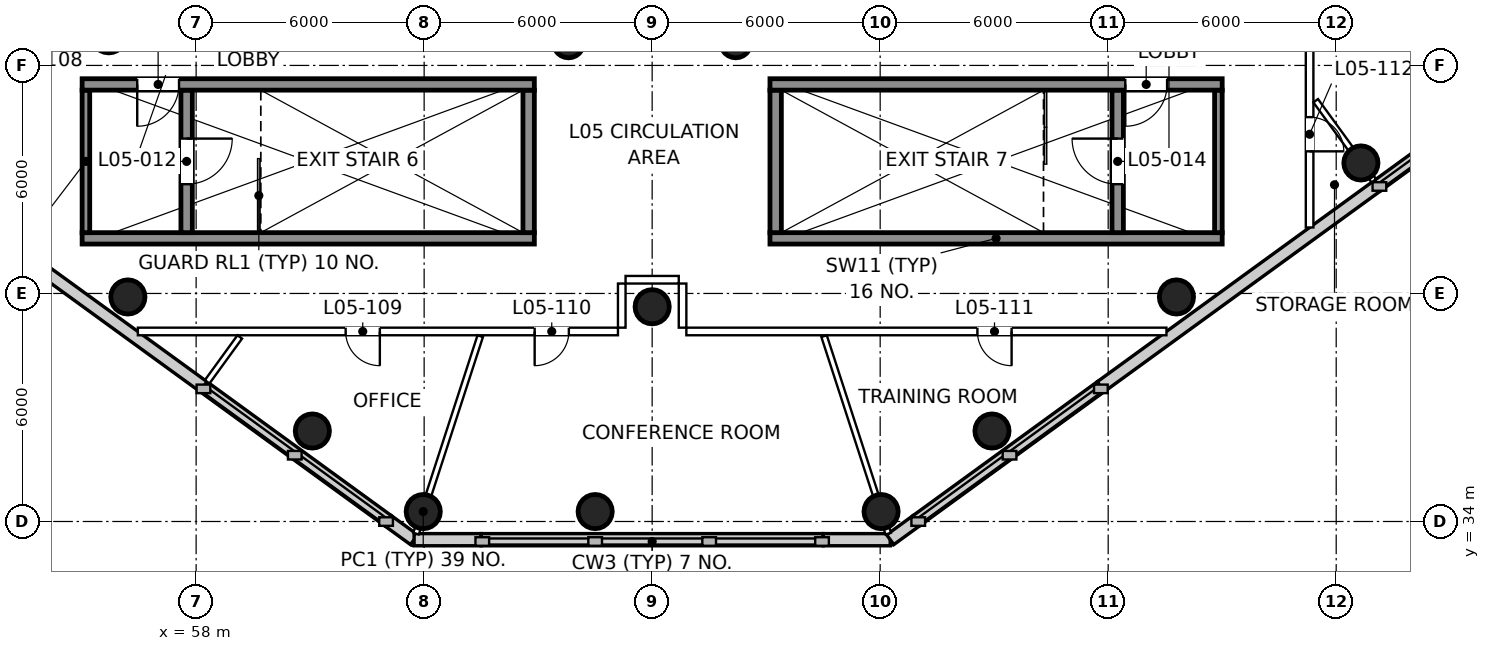
"""IFC4 building model, lengths in metres.
Left out: names, types, materials, properties, quantities, classifications, styles, units other than length and angle.
Written with IfcOpenShell. Run it as: python <this file> out.ifc"""

import sys

from ifc_helpers import new_model, si_unit, direction, frame, frame_2d, origin, origin_2d, place, context, subcontext, project, spatial, rectangle, circle, extrude, element, fill, save


model = new_model("IFC4")
c1 = context("Model", 3, precision=1e-05, world=origin(), true_north=direction((0.0, 1.0)))
c2 = subcontext(c1, "Body", "Model", "MODEL_VIEW")
j1 = project(units=[si_unit("LENGTHUNIT", "METRE"), si_unit("PLANEANGLEUNIT", "RADIAN")], contexts=[c1])
p1 = place(None, origin())
s1 = spatial("IfcSite", under=j1, at=p1, CompositionType="ELEMENT")
p2 = place(p1, origin())
s2 = spatial("IfcBuilding", under=s1, at=p2, CompositionType="ELEMENT")
p3 = place(p2, frame((0.0, 0.0, 34.0)))
s3 = spatial("IfcBuildingStorey", under=s2, at=p3, CompositionType="ELEMENT", Elevation=34.0)
for number, where, z_axis, x_axis in (
    (1, (55.7, 46.78, 0.0), (0.0, 0.0, 1.0), (1.0, 0.0, 0.0)),
    (2, (70.0, 39.65, 0.0), (0.0, 0.0, 1.0), (1.0, 0.0, 0.0)),
):
    element("IfcColumn", number, at=place(p3, frame(where, z_axis=z_axis, x_axis=x_axis)), inside=s3, PredefinedType="COLUMN", context=c2, shape_type="SweptSolid", body=[
        extrude(circle(Radius=0.45, at=origin_2d()), origin(), (0.0, 0.0, 1.0), 5.0),
    ])
for number, where, z_axis, x_axis in (
    (3, (67.8, 46.6, 0.0), (0.0, 0.0, 1.0), (1.0, 0.0, 0.0)),
    (4, (72.2, 46.6, 0.0), (0.0, 0.0, 1.0), (1.0, 0.0, 0.0)),
):
    element("IfcColumn", number, at=place(p3, frame(where, z_axis=z_axis, x_axis=x_axis)), inside=s3, PredefinedType="COLUMN", context=c2, shape_type="SweptSolid", body=[
        extrude(circle(Radius=0.4, at=origin_2d()), origin(), (0.0, 0.0, 1.0), 5.0),
    ])
for number, where, z_axis, x_axis in (
    (5, (56.204, 39.908, 0.0), (0.0, 0.0, 1.0), (1.0, 0.0, 0.0)),
    (6, (61.058, 36.381, 0.0), (0.0, 0.0, 1.0), (1.0, 0.0, 0.0)),
    (7, (63.976, 34.261, 0.0), (0.0, 0.0, 1.0), (1.0, 0.0, 0.0)),
    (8, (68.5, 34.261, 0.0), (0.0, 0.0, 1.0), (1.0, 0.0, 0.0)),
    (9, (76.024, 34.261, 0.0), (0.0, 0.0, 1.0), (1.0, 0.0, 0.0)),
    (10, (78.942, 36.381, 0.0), (0.0, 0.0, 1.0), (1.0, 0.0, 0.0)),
    (11, (83.796, 39.908, 0.0), (0.0, 0.0, 1.0), (1.0, 0.0, 0.0)),
    (12, (88.65, 43.434, 0.0), (0.0, 0.0, 1.0), (1.0, 0.0, 0.0)),
):
    element("IfcColumn", number, at=place(p3, frame(where, z_axis=z_axis, x_axis=x_axis)), inside=s3, PredefinedType="COLUMN", context=c2, shape_type="SweptSolid", body=[
        extrude(circle(Radius=0.45, at=origin_2d()), origin(), (0.0, 0.0, 1.0), 5.0),
    ])
p4 = place(p3, frame((50.915, 42.836, 0.0), z_axis=(0.0, 0.0, 1.0), x_axis=(0.809022210299, -0.587778073121, 0.0)))
e13 = element("IfcWall", 13, at=p4, inside=s3, PredefinedType="SOLIDWALL", context=c2, shape_type="SweptSolid", body=[
    extrude(rectangle(XDim=9.0, YDim=0.32, at=frame_2d((4.5, 0.0))), origin(), (0.0, 0.0, 1.0), 4.6),
])
p5 = place(p3, frame((58.196, 37.546, 0.0), z_axis=(0.0, 0.0, 1.0), x_axis=(0.809019288122, -0.587782095208, 0.0)))
e14 = element("IfcWall", 14, at=p5, inside=s3, PredefinedType="SOLIDWALL", context=c2, shape_type="SweptSolid", body=[
    extrude(rectangle(XDim=6.0, YDim=0.32, at=frame_2d((3.0, 0.0))), origin(), (0.0, 0.0, 1.0), 0.9),
])
p6 = place(p3, frame((63.05, 34.019, 0.0), z_axis=(0.0, 0.0, 1.0), x_axis=(0.809034999426, -0.587760469668, 0.0)))
e15 = element("IfcWall", 15, at=p6, inside=s3, PredefinedType="SOLIDWALL", context=c2, shape_type="SweptSolid", body=[
    extrude(rectangle(XDim=0.847, YDim=0.32, at=frame_2d((0.424, 0.0))), origin(), (0.0, 0.0, 1.0), 4.6),
])
p7 = place(p3, frame((63.736, 33.521, 0.0), z_axis=(0.0, 0.0, 1.0), x_axis=(1.0, 0.0, 0.0)))
e16 = element("IfcWall", 16, at=p7, inside=s3, PredefinedType="SOLIDWALL", context=c2, shape_type="SweptSolid", body=[
    extrude(rectangle(XDim=1.764, YDim=0.32, at=frame_2d((0.882, 0.0))), origin(), (0.0, 0.0, 1.0), 4.6),
])
p8 = place(p3, frame((65.5, 33.521, 0.0), z_axis=(0.0, 0.0, 1.0), x_axis=(1.0, 0.0, 0.0)))
e17 = element("IfcWall", 17, at=p8, inside=s3, PredefinedType="SOLIDWALL", context=c2, shape_type="SweptSolid", body=[
    extrude(rectangle(XDim=9.0, YDim=0.32, at=frame_2d((4.5, 0.0))), origin(), (0.0, 0.0, 1.0), 0.9),
])
p9 = place(p3, frame((74.5, 33.521, 0.0), z_axis=(0.0, 0.0, 1.0), x_axis=(1.0, 0.0, 0.0)))
e18 = element("IfcWall", 18, at=p9, inside=s3, PredefinedType="SOLIDWALL", context=c2, shape_type="SweptSolid", body=[
    extrude(rectangle(XDim=1.764, YDim=0.32, at=frame_2d((0.882, 0.0))), origin(), (0.0, 0.0, 1.0), 4.6),
])
p10 = place(p3, frame((76.264, 33.521, 0.0), z_axis=(0.0, 0.0, 1.0), x_axis=(0.809034999426, 0.587760469668, 0.0)))
e19 = element("IfcWall", 19, at=p10, inside=s3, PredefinedType="SOLIDWALL", context=c2, shape_type="SweptSolid", body=[
    extrude(rectangle(XDim=0.847, YDim=0.32, at=frame_2d((0.424, 0.0))), origin(), (0.0, 0.0, 1.0), 4.6),
])
p11 = place(p3, frame((76.95, 34.019, 0.0), z_axis=(0.0, 0.0, 1.0), x_axis=(0.809019288122, 0.587782095208, 0.0)))
e20 = element("IfcWall", 20, at=p11, inside=s3, PredefinedType="SOLIDWALL", context=c2, shape_type="SweptSolid", body=[
    extrude(rectangle(XDim=6.0, YDim=0.32, at=frame_2d((3.0, 0.0))), origin(), (0.0, 0.0, 1.0), 0.9),
])
p12 = place(p3, frame((81.804, 37.546, 0.0), z_axis=(0.0, 0.0, 1.0), x_axis=(0.809022210299, 0.587778073121, 0.0)))
e21 = element("IfcWall", 21, at=p12, inside=s3, PredefinedType="SOLIDWALL", context=c2, shape_type="SweptSolid", body=[
    extrude(rectangle(XDim=9.0, YDim=0.32, at=frame_2d((4.5, 0.0))), origin(), (0.0, 0.0, 1.0), 4.6),
])
p13 = place(p3, frame((89.085, 42.836, 0.0), z_axis=(0.0, 0.0, 1.0), x_axis=(0.808999938455, 0.587808727036, 0.0)))
e22 = element("IfcWall", 22, at=p13, inside=s3, PredefinedType="SOLIDWALL", context=c2, shape_type="SweptSolid", body=[
    extrude(rectangle(XDim=9.0, YDim=0.32, at=frame_2d((4.5, 0.0))), origin(), (0.0, 0.0, 1.0), 0.9),
])
for number, where, z_axis, x_axis in (
    (23, (55.0, 41.45, 0.0), (0.0, 0.0, 1.0), (1.0, 0.0, 0.0)),
    (24, (73.1, 41.45, 0.0), (0.0, 0.0, 1.0), (1.0, 0.0, 0.0)),
):
    element("IfcWall", number, at=place(p3, frame(where, z_axis=z_axis, x_axis=x_axis)), inside=s3, PredefinedType="SHEAR", context=c2, shape_type="SweptSolid", body=[
        extrude(rectangle(XDim=11.9, YDim=0.3, at=frame_2d((5.95, 0.0))), origin(), (0.0, 0.0, 1.0), 5.0),
    ])
p14 = place(p3, frame((55.1, 41.6, 0.0), z_axis=(0.0, 0.0, 1.0), x_axis=(0.0, 1.0, 0.0)))
e25 = element("IfcWall", 25, at=p14, inside=s3, PredefinedType="SHEAR", context=c2, shape_type="SweptSolid", body=[
    extrude(rectangle(XDim=3.75, YDim=0.2, at=frame_2d((1.875, 0.0))), origin(), (0.0, 0.0, 1.0), 5.0),
])
p15 = place(p3, frame((57.75, 41.6, 0.0), z_axis=(0.0, 0.0, 1.0), x_axis=(0.0, 1.0, 0.0)))
e26 = element("IfcWall", 26, at=p15, inside=s3, PredefinedType="SHEAR", context=c2, shape_type="SweptSolid", body=[
    extrude(rectangle(XDim=3.75, YDim=0.3, at=frame_2d((1.875, 0.0))), origin(), (0.0, 0.0, 1.0), 5.0),
])
p16 = place(p15, frame((1.275, 0.0, 0.0)))
e27 = element("IfcOpeningElement", 27, at=p16, cuts=e26, PredefinedType="OPENING", context=c2, shape_type="SweptSolid", body=[
    extrude(rectangle(XDim=1.2, YDim=2.1, at=frame_2d((0.6, 1.05))), frame((0.0, 0.16, 0.0), z_axis=(0.0, -1.0, 0.0), x_axis=(1.0, 0.0, 0.0)), (0.0, 0.0, 1.0), 0.32),
])
for number, where, z_axis, x_axis in (
    (28, (66.75, 41.6, 0.0), (0.0, 0.0, 1.0), (0.0, 1.0, 0.0)),
    (29, (73.25, 41.6, 0.0), (0.0, 0.0, 1.0), (0.0, 1.0, 0.0)),
):
    element("IfcWall", number, at=place(p3, frame(where, z_axis=z_axis, x_axis=x_axis)), inside=s3, PredefinedType="SHEAR", context=c2, shape_type="SweptSolid", body=[
        extrude(rectangle(XDim=3.75, YDim=0.3, at=frame_2d((1.875, 0.0))), origin(), (0.0, 0.0, 1.0), 5.0),
    ])
p17 = place(p3, frame((82.25, 41.6, 0.0), z_axis=(0.0, 0.0, 1.0), x_axis=(0.0, 1.0, 0.0)))
e30 = element("IfcWall", 30, at=p17, inside=s3, PredefinedType="SHEAR", context=c2, shape_type="SweptSolid", body=[
    extrude(rectangle(XDim=3.75, YDim=0.3, at=frame_2d((1.875, 0.0))), origin(), (0.0, 0.0, 1.0), 5.0),
])
p18 = place(p17, frame((1.275, 0.0, 0.0)))
e31 = element("IfcOpeningElement", 31, at=p18, cuts=e30, PredefinedType="OPENING", context=c2, shape_type="SweptSolid", body=[
    extrude(rectangle(XDim=1.2, YDim=2.1, at=frame_2d((0.6, 1.05))), frame((0.0, 0.16, 0.0), z_axis=(0.0, -1.0, 0.0), x_axis=(1.0, 0.0, 0.0)), (0.0, 0.0, 1.0), 0.32),
])
p19 = place(p3, frame((84.9, 41.6, 0.0), z_axis=(0.0, 0.0, 1.0), x_axis=(0.0, 1.0, 0.0)))
e32 = element("IfcWall", 32, at=p19, inside=s3, PredefinedType="SHEAR", context=c2, shape_type="SweptSolid", body=[
    extrude(rectangle(XDim=3.75, YDim=0.2, at=frame_2d((1.875, 0.0))), origin(), (0.0, 0.0, 1.0), 5.0),
])
p20 = place(p3, frame((55.0, 45.5, 0.0), z_axis=(0.0, 0.0, 1.0), x_axis=(1.0, 0.0, 0.0)))
e33 = element("IfcWall", 33, at=p20, inside=s3, PredefinedType="SHEAR", context=c2, shape_type="SweptSolid", body=[
    extrude(rectangle(XDim=11.9, YDim=0.3, at=frame_2d((5.95, 0.0))), origin(), (0.0, 0.0, 1.0), 5.0),
])
p21 = place(p20, frame((1.45, 0.0, 0.0)))
e34 = element("IfcOpeningElement", 34, at=p21, cuts=e33, PredefinedType="OPENING", context=c2, shape_type="SweptSolid", body=[
    extrude(rectangle(XDim=1.1, YDim=2.1, at=frame_2d((0.55, 1.05))), frame((0.0, 0.16, 0.0), z_axis=(0.0, -1.0, 0.0), x_axis=(1.0, 0.0, 0.0)), (0.0, 0.0, 1.0), 0.32),
])
p22 = place(p3, frame((73.1, 45.5, 0.0), z_axis=(0.0, 0.0, 1.0), x_axis=(1.0, 0.0, 0.0)))
e35 = element("IfcWall", 35, at=p22, inside=s3, PredefinedType="SHEAR", context=c2, shape_type="SweptSolid", body=[
    extrude(rectangle(XDim=11.9, YDim=0.3, at=frame_2d((5.95, 0.0))), origin(), (0.0, 0.0, 1.0), 5.0),
])
p23 = place(p22, frame((9.35, 0.0, 0.0)))
e36 = element("IfcOpeningElement", 36, at=p23, cuts=e35, PredefinedType="OPENING", context=c2, shape_type="SweptSolid", body=[
    extrude(rectangle(XDim=1.1, YDim=2.1, at=frame_2d((0.55, 1.05))), frame((0.0, 0.16, 0.0), z_axis=(0.0, -1.0, 0.0), x_axis=(1.0, 0.0, 0.0)), (0.0, 0.0, 1.0), 0.32),
])
p24 = place(p3, frame((87.3, 47.85, 0.0), z_axis=(0.0, 0.0, 1.0), x_axis=(0.0, -1.0, 0.0)))
e37 = element("IfcWall", 37, at=p24, inside=s3, PredefinedType="PARTITIONING", context=c2, shape_type="SweptSolid", body=[
    extrude(rectangle(XDim=6.113, YDim=0.2, at=frame_2d((3.057, 0.0))), origin(), (0.0, 0.0, 1.0), 3.9),
])
p25 = place(p24, frame((3.21, 0.0, 0.0)))
e38 = element("IfcOpeningElement", 38, at=p25, cuts=e37, PredefinedType="OPENING", context=c2, shape_type="SweptSolid", body=[
    extrude(rectangle(XDim=0.9, YDim=2.1, at=frame_2d((0.45, 1.05))), frame((0.0, 0.11, 0.0), z_axis=(0.0, -1.0, 0.0), x_axis=(1.0, 0.0, 0.0)), (0.0, 0.0, 1.0), 0.22),
])
p26 = place(p3, frame((83.533, 39.0, 0.0), z_axis=(0.0, 0.0, 1.0), x_axis=(-1.0, 0.0, 0.0)))
e39 = element("IfcWall", 39, at=p26, inside=s3, PredefinedType="PARTITIONING", context=c2, shape_type="SweptSolid", body=[
    extrude(rectangle(XDim=12.633, YDim=0.2, at=frame_2d((6.317, 0.0))), origin(), (0.0, 0.0, 1.0), 3.9),
])
p27 = place(p26, frame((4.074, 0.0, 0.0)))
e40 = element("IfcOpeningElement", 40, at=p27, cuts=e39, PredefinedType="OPENING", context=c2, shape_type="SweptSolid", body=[
    extrude(rectangle(XDim=0.9, YDim=2.1, at=frame_2d((0.45, 1.05))), frame((0.0, 0.11, 0.0), z_axis=(0.0, -1.0, 0.0), x_axis=(1.0, 0.0, 0.0)), (0.0, 0.0, 1.0), 0.22),
])
p28 = place(p3, frame((70.8, 39.1, 0.0), z_axis=(0.0, 0.0, 1.0), x_axis=(0.0, 1.0, 0.0)))
e41 = element("IfcWall", 41, at=p28, inside=s3, PredefinedType="PARTITIONING", context=c2, shape_type="SweptSolid", body=[
    extrude(rectangle(XDim=1.161, YDim=0.2, at=frame_2d((0.581, 0.0))), origin(), (0.0, 0.0, 1.0), 4.6),
])
p29 = place(p3, frame((70.7, 40.361, 0.0), z_axis=(0.0, 0.0, 1.0), x_axis=(-1.0, 0.0, 0.0)))
e42 = element("IfcWall", 42, at=p29, inside=s3, PredefinedType="PARTITIONING", context=c2, shape_type="SweptSolid", body=[
    extrude(rectangle(XDim=1.4, YDim=0.2, at=frame_2d((0.7, 0.0))), origin(), (0.0, 0.0, 1.0), 4.6),
])
p30 = place(p3, frame((69.2, 40.261, 0.0), z_axis=(0.0, 0.0, 1.0), x_axis=(0.0, -1.0, 0.0)))
e43 = element("IfcWall", 43, at=p30, inside=s3, PredefinedType="PARTITIONING", context=c2, shape_type="SweptSolid", body=[
    extrude(rectangle(XDim=1.161, YDim=0.2, at=frame_2d((0.581, 0.0))), origin(), (0.0, 0.0, 1.0), 4.1),
])
p31 = place(p3, frame((69.1, 39.0, 0.0), z_axis=(0.0, 0.0, 1.0), x_axis=(-1.0, 0.0, 0.0)))
e44 = element("IfcWall", 44, at=p31, inside=s3, PredefinedType="PARTITIONING", context=c2, shape_type="SweptSolid", body=[
    extrude(rectangle(XDim=12.633, YDim=0.2, at=frame_2d((6.317, 0.0))), origin(), (0.0, 0.0, 1.0), 3.9),
])
p32 = place(p31, frame((6.266, 0.0, 0.0)))
e45 = element("IfcOpeningElement", 45, at=p32, cuts=e44, PredefinedType="OPENING", context=c2, shape_type="SweptSolid", body=[
    extrude(rectangle(XDim=0.9, YDim=2.1, at=frame_2d((0.45, 1.05))), frame((0.0, 0.11, 0.0), z_axis=(0.0, -1.0, 0.0), x_axis=(1.0, 0.0, 0.0)), (0.0, 0.0, 1.0), 0.22),
])
p33 = place(p31, frame((1.292, 0.0, 0.0)))
e46 = element("IfcOpeningElement", 46, at=p33, cuts=e44, PredefinedType="OPENING", context=c2, shape_type="SweptSolid", body=[
    extrude(rectangle(XDim=0.9, YDim=2.1, at=frame_2d((0.45, 1.05))), frame((0.0, 0.11, 0.0), z_axis=(0.0, -1.0, 0.0), x_axis=(1.0, 0.0, 0.0)), (0.0, 0.0, 1.0), 0.22),
])
for number, where, z_axis, x_axis in (
    (47, (63.788, 33.681, 0.0), (0.0, 0.0, 1.0), (0.309, 0.951, 0.0)),
    (48, (76.212, 33.681, 0.0), (0.0, 0.0, 1.0), (-0.309, 0.951, 0.0)),
):
    element("IfcWall", number, at=place(p3, frame(where, z_axis=z_axis, x_axis=x_axis)), inside=s3, PredefinedType="PARTITIONING", context=c2, shape_type="SweptSolid", body=[
        extrude(rectangle(XDim=5.463, YDim=0.15, at=frame_2d((2.731, 0.0))), origin(), (0.0, 0.0, 1.0), 4.6),
    ])
p34 = place(p3, frame((58.29, 37.675, 0.0), z_axis=(0.0, 0.0, 1.0), x_axis=(0.587833462746, 0.808981965236, 0.0)))
e49 = element("IfcWall", 49, at=p34, inside=s3, PredefinedType="PARTITIONING", context=c2, shape_type="SweptSolid", body=[
    extrude(rectangle(XDim=1.459, YDim=0.15, at=frame_2d((0.73, 0.0))), origin(), (0.0, 0.0, 1.0), 3.9),
])
p35 = place(p3, frame((88.991, 42.965, 0.0), z_axis=(0.0, 0.0, 1.0), x_axis=(-0.5877756855, 0.80902394497, 0.0)))
e50 = element("IfcWall", 50, at=p35, inside=s3, PredefinedType="PARTITIONING", context=c2, shape_type="SweptSolid", body=[
    extrude(rectangle(XDim=2.603, YDim=0.15, at=frame_2d((1.302, 0.0))), origin(), (0.0, 0.0, 1.0), 4.6),
])
p36 = place(p21, frame((1.1, 0.0, 0.0), z_axis=(0.0, 0.0, 1.0), x_axis=(-1.0, 0.0, 0.0)))
e51 = element("IfcDoor", 51, at=p36, inside=s3, OperationType="SINGLE_SWING_RIGHT", PredefinedType="DOOR", context=c2, shape_type="SweptSolid", body=[
    extrude(rectangle(XDim=1.1, YDim=2.1, at=frame_2d((0.55, 1.05))), frame((0.0, 0.025, 0.0), z_axis=(0.0, -1.0, 0.0), x_axis=(1.0, 0.0, 0.0)), (0.0, 0.0, 1.0), 0.05),
])
fill(e34, e51)
p37 = place(p16, frame((1.2, 0.0, 0.0), z_axis=(0.0, 0.0, 1.0), x_axis=(-1.0, 0.0, 0.0)))
e52 = element("IfcDoor", 52, at=p37, inside=s3, OperationType="SINGLE_SWING_LEFT", PredefinedType="DOOR", context=c2, shape_type="SweptSolid", body=[
    extrude(rectangle(XDim=1.2, YDim=2.1, at=frame_2d((0.6, 1.05))), frame((0.0, 0.025, 0.0), z_axis=(0.0, -1.0, 0.0), x_axis=(1.0, 0.0, 0.0)), (0.0, 0.0, 1.0), 0.05),
])
fill(e27, e52)
p38 = place(p23, frame((1.1, 0.0, 0.0), z_axis=(0.0, 0.0, 1.0), x_axis=(-1.0, 0.0, 0.0)))
e53 = element("IfcDoor", 53, at=p38, inside=s3, OperationType="SINGLE_SWING_RIGHT", PredefinedType="DOOR", context=c2, shape_type="SweptSolid", body=[
    extrude(rectangle(XDim=1.1, YDim=2.1, at=frame_2d((0.55, 1.05))), frame((0.0, 0.025, 0.0), z_axis=(0.0, -1.0, 0.0), x_axis=(1.0, 0.0, 0.0)), (0.0, 0.0, 1.0), 0.05),
])
fill(e36, e53)
p39 = place(p18, origin())
e54 = element("IfcDoor", 54, at=p39, inside=s3, OperationType="SINGLE_SWING_RIGHT", PredefinedType="DOOR", context=c2, shape_type="SweptSolid", body=[
    extrude(rectangle(XDim=1.2, YDim=2.1, at=frame_2d((0.6, 1.05))), frame((0.0, 0.025, 0.0), z_axis=(0.0, -1.0, 0.0), x_axis=(1.0, 0.0, 0.0)), (0.0, 0.0, 1.0), 0.05),
])
fill(e31, e54)
p40 = place(p32, origin())
e55 = element("IfcDoor", 55, at=p40, inside=s3, OperationType="SINGLE_SWING_LEFT", PredefinedType="DOOR", context=c2, shape_type="SweptSolid", body=[
    extrude(rectangle(XDim=0.9, YDim=2.1, at=frame_2d((0.45, 1.05))), frame((0.0, 0.025, 0.0), z_axis=(0.0, -1.0, 0.0), x_axis=(1.0, 0.0, 0.0)), (0.0, 0.0, 1.0), 0.05),
])
fill(e45, e55)
p41 = place(p33, origin())
e56 = element("IfcDoor", 56, at=p41, inside=s3, OperationType="SINGLE_SWING_RIGHT", PredefinedType="DOOR", context=c2, shape_type="SweptSolid", body=[
    extrude(rectangle(XDim=0.9, YDim=2.1, at=frame_2d((0.45, 1.05))), frame((0.0, 0.025, 0.0), z_axis=(0.0, -1.0, 0.0), x_axis=(1.0, 0.0, 0.0)), (0.0, 0.0, 1.0), 0.05),
])
fill(e46, e56)
p42 = place(p27, origin())
e57 = element("IfcDoor", 57, at=p42, inside=s3, OperationType="SINGLE_SWING_LEFT", PredefinedType="DOOR", context=c2, shape_type="SweptSolid", body=[
    extrude(rectangle(XDim=0.9, YDim=2.1, at=frame_2d((0.45, 1.05))), frame((0.0, 0.025, 0.0), z_axis=(0.0, -1.0, 0.0), x_axis=(1.0, 0.0, 0.0)), (0.0, 0.0, 1.0), 0.05),
])
fill(e40, e57)
p43 = place(p25, origin())
e58 = element("IfcDoor", 58, at=p43, inside=s3, OperationType="SINGLE_SWING_RIGHT", PredefinedType="DOOR", context=c2, shape_type="SweptSolid", body=[
    extrude(rectangle(XDim=0.9, YDim=2.1, at=frame_2d((0.45, 1.05))), frame((0.0, 0.025, 0.0), z_axis=(0.0, -1.0, 0.0), x_axis=(1.0, 0.0, 0.0)), (0.0, 0.0, 1.0), 0.05),
])
fill(e38, e58)
save(model, sys.argv[1])
